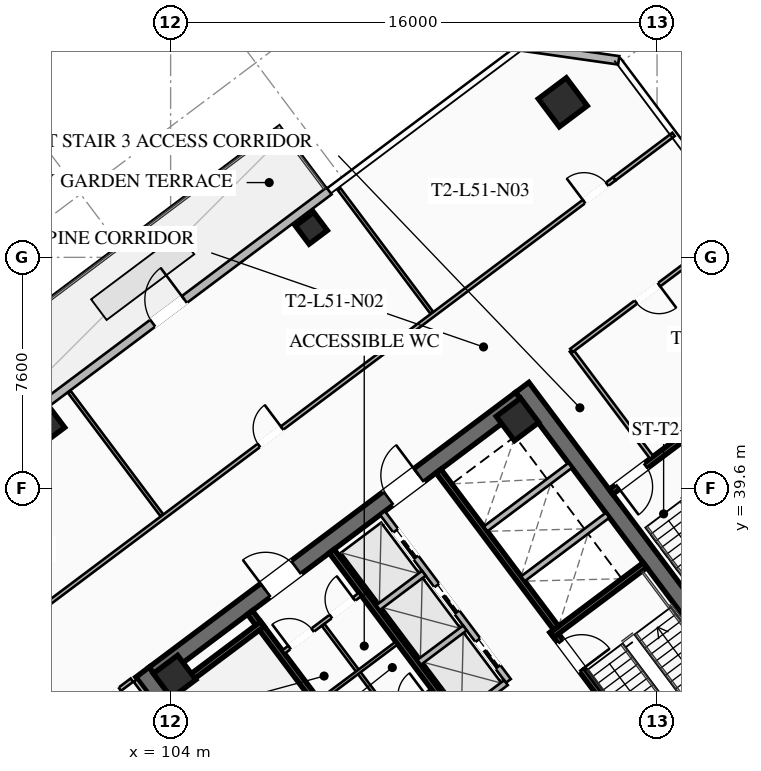
"""IFC4 building model, lengths in metres.
Left out: names, types, materials, properties, quantities, classifications, styles, units other than length and angle.
Written with IfcOpenShell. Run it as: python <this file> out.ifc"""

import sys

from ifc_helpers import new_model, si_unit, direction, frame, frame_2d, origin, origin_2d, place, context, subcontext, project, spatial, rectangle, hollow_rectangle, extrude, element, fill, save


model = new_model("IFC4")
c1 = context("Model", 3, precision=1e-05, world=origin(), true_north=direction((0.0, 1.0)))
c2 = subcontext(c1, "Body", "Model", "MODEL_VIEW")
j1 = project(units=[si_unit("LENGTHUNIT", "METRE"), si_unit("PLANEANGLEUNIT", "RADIAN")], contexts=[c1])
p1 = place(None, origin())
s1 = spatial("IfcSite", under=j1, at=p1, CompositionType="ELEMENT")
p2 = place(p1, origin())
s2 = spatial("IfcBuilding", under=s1, at=p2, CompositionType="ELEMENT")
p3 = place(p2, frame((0.0, 0.0, 188.95)))
s3 = spatial("IfcBuildingStorey", under=s2, at=p3, CompositionType="ELEMENT", Elevation=188.95)
for number, where, z_axis, x_axis in (
    (1, (112.436, 21.077, 0.0), (0.0, 0.0, 1.0), (-0.6, 0.8, 0.0)),
    (2, (115.564, 42.923, 0.0), (0.0, 0.0, 1.0), (0.6, -0.8, 0.0)),
):
    element("IfcWall", number, at=place(p3, frame(where, z_axis=z_axis, x_axis=x_axis)), inside=s3, PredefinedType="SHEAR", context=c2, shape_type="SweptSolid", body=[
        extrude(rectangle(XDim=15.6, YDim=0.55, at=frame_2d((7.8, 0.0))), origin(), (0.0, 0.0, 1.0), 3.55),
    ])
p4 = place(p3, frame((103.461, 33.502, 0.0), z_axis=(0.0, 0.0, 1.0), x_axis=(0.799998054672, 0.600002593761, 0.0)))
e3 = element("IfcWall", 3, at=p4, inside=s3, PredefinedType="SHEAR", context=c2, shape_type="SweptSolid", body=[
    extrude(rectangle(XDim=15.06, YDim=0.55, at=frame_2d((7.53, 0.0))), origin(), (0.0, 0.0, 1.0), 3.55),
])
p5 = place(p4, frame((4.58, 0.0, 0.0)))
e4 = element("IfcOpeningElement", 4, at=p5, cuts=e3, PredefinedType="OPENING", context=c2, shape_type="SweptSolid", body=[
    extrude(rectangle(XDim=1.25, YDim=2.25, at=frame_2d((0.625, 1.125))), frame((0.0, 0.285, 0.0), z_axis=(0.0, -1.0, 0.0), x_axis=(1.0, 0.0, 0.0)), (0.0, 0.0, 1.0), 0.57),
])
p6 = place(p4, frame((9.63, 0.0, 0.0)))
e5 = element("IfcOpeningElement", 5, at=p6, cuts=e3, PredefinedType="OPENING", context=c2, shape_type="SweptSolid", body=[
    extrude(rectangle(XDim=1.25, YDim=2.25, at=frame_2d((0.625, 1.125))), frame((0.0, 0.285, 0.0), z_axis=(0.0, -1.0, 0.0), x_axis=(1.0, 0.0, 0.0)), (0.0, 0.0, 1.0), 0.57),
])
for number, where, z_axis, x_axis in (
    (6, (115.41, 41.87, 0.0), (0.0, 0.0, 1.0), (0.8, 0.6, 0.0)),
    (7, (104.13, 33.41, 0.0), (0.0, 0.0, 1.0), (0.8, 0.6, 0.0)),
):
    element("IfcColumn", number, at=place(p3, frame(where, z_axis=z_axis, x_axis=x_axis)), inside=s3, PredefinedType="COLUMN", context=c2, shape_type="SweptSolid", body=[
        extrude(hollow_rectangle(XDim=1.0, YDim=1.0, WallThickness=0.04, at=origin_2d()), origin(), (0.0, 0.0, 1.0), 3.37),
    ])
p7 = place(p3, frame((116.9, 52.3, 0.0), z_axis=(0.0, 0.0, 1.0), x_axis=(0.799999996291, 0.600000004945, 0.0)))
e8 = element("IfcColumn", 8, at=p7, inside=s3, PredefinedType="COLUMN", context=c2, shape_type="SweptSolid", body=[
    extrude(hollow_rectangle(XDim=1.15, YDim=1.15, WallThickness=0.045, at=origin_2d()), origin(), (0.0, 0.0, 1.0), 3.37),
])
for number, where, z_axis, x_axis in (
    (9, (108.63, 48.16, 0.0), (0.0, 0.0, 1.0), (0.8, 0.6, 0.0)),
    (10, (99.99, 41.68, 0.0), (0.0, 0.0, 1.0), (0.8, 0.6, 0.0)),
):
    element("IfcColumn", number, at=place(p3, frame(where, z_axis=z_axis, x_axis=x_axis)), inside=s3, PredefinedType="COLUMN", context=c2, shape_type="SweptSolid", body=[
        extrude(hollow_rectangle(XDim=0.75, YDim=0.75, WallThickness=0.032, at=origin_2d()), origin(), (0.0, 0.0, 1.0), 3.37),
    ])
p8 = place(p3, frame((98.652, 41.464, 0.0), z_axis=(0.0, 0.0, 1.0), x_axis=(0.799997780501, 0.60000295932, 0.0)))
e11 = element("IfcWall", 11, at=p8, inside=s3, PredefinedType="SOLIDWALL", context=c2, shape_type="SweptSolid", body=[
    extrude(rectangle(XDim=13.2, YDim=0.28, at=frame_2d((6.6, 0.0))), origin(), (0.0, 0.0, 1.0), 3.37),
])
p9 = place(p8, frame((5.95, 0.0, 0.0)))
e12 = element("IfcOpeningElement", 12, at=p9, cuts=e11, PredefinedType="OPENING", context=c2, shape_type="SweptSolid", body=[
    extrude(rectangle(XDim=1.3, YDim=2.15, at=frame_2d((0.65, 1.075))), frame((0.0, 0.15, 0.0), z_axis=(0.0, -1.0, 0.0), x_axis=(1.0, 0.0, 0.0)), (0.0, 0.0, 1.0), 0.3),
])
p10 = place(p3, frame((115.52, 54.14, 0.0), z_axis=(0.0, 0.0, 1.0), x_axis=(0.989950994782, -0.141410847992, 0.0)))
e13 = element("IfcWall", 13, at=p10, inside=s3, PredefinedType="SOLIDWALL", context=c2, shape_type="SweptSolid", body=[
    extrude(rectangle(XDim=3.253, YDim=0.28, at=frame_2d((1.626, 0.0))), origin(), (0.0, 0.0, 1.0), 3.37),
])
p11 = place(p3, frame((111.44, 29.08, 0.0), z_axis=(0.0, 0.0, 1.0), x_axis=(-0.59999029481, 0.8000072788, 0.0)))
e14 = element("IfcWall", 14, at=p11, inside=s3, PredefinedType="SHEAR", context=c2, shape_type="SweptSolid", body=[
    extrude(rectangle(XDim=8.05, YDim=0.2, at=frame_2d((4.025, 0.0))), origin(), (0.0, 0.0, 1.0), 3.37),
])
p12 = place(p11, frame((0.45, 0.0, 0.0)))
e15 = element("IfcOpeningElement", 15, at=p12, cuts=e14, PredefinedType="OPENING", context=c2, shape_type="SweptSolid", body=[
    extrude(rectangle(XDim=1.15, YDim=2.2, at=frame_2d((0.575, 1.1))), frame((0.0, 0.11, 0.0), z_axis=(0.0, -1.0, 0.0), x_axis=(1.0, 0.0, 0.0)), (0.0, 0.0, 1.0), 0.22),
])
p13 = place(p3, frame((103.956, 32.842, 0.0), z_axis=(0.0, 0.0, 1.0), x_axis=(0.800015298837, 0.599979601008, 0.0)))
e16 = element("IfcWall", 16, at=p13, inside=s3, PredefinedType="SHEAR", context=c2, shape_type="SweptSolid", body=[
    extrude(rectangle(XDim=3.83, YDim=0.2, at=frame_2d((1.915, 0.0))), origin(), (0.0, 0.0, 1.0), 3.37),
])
p14 = place(p3, frame((116.56, 34.92, 0.0), z_axis=(0.0, 0.0, 1.0), x_axis=(0.59999029481, -0.8000072788, 0.0)))
e17 = element("IfcWall", 17, at=p14, inside=s3, PredefinedType="SHEAR", context=c2, shape_type="SweptSolid", body=[
    extrude(rectangle(XDim=8.05, YDim=0.2, at=frame_2d((4.025, 0.0))), origin(), (0.0, 0.0, 1.0), 3.37),
])
p15 = place(p14, frame((0.45, 0.0, 0.0)))
e18 = element("IfcOpeningElement", 18, at=p15, cuts=e17, PredefinedType="OPENING", context=c2, shape_type="SweptSolid", body=[
    extrude(rectangle(XDim=1.15, YDim=2.2, at=frame_2d((0.575, 1.1))), frame((0.0, 0.11, 0.0), z_axis=(0.0, -1.0, 0.0), x_axis=(1.0, 0.0, 0.0)), (0.0, 0.0, 1.0), 0.22),
])
p16 = place(p3, frame((116.54, 34.78, 0.0), z_axis=(0.0, 0.0, 1.0), x_axis=(0.800015298837, 0.599979601008, 0.0)))
e19 = element("IfcWall", 19, at=p16, inside=s3, PredefinedType="SHEAR", context=c2, shape_type="SweptSolid", body=[
    extrude(rectangle(XDim=3.83, YDim=0.2, at=frame_2d((1.915, 0.0))), origin(), (0.0, 0.0, 1.0), 3.37),
])
p17 = place(p3, frame((117.998, 25.936, 0.0), z_axis=(0.0, 0.0, 1.0), x_axis=(-0.600002693989, 0.799997979501, 0.0)))
e20 = element("IfcWall", 20, at=p17, inside=s3, PredefinedType="SHEAR", context=c2, shape_type="SweptSolid", body=[
    extrude(rectangle(XDim=14.5, YDim=0.2, at=frame_2d((7.25, 0.0))), origin(), (0.0, 0.0, 1.0), 3.37),
])
p18 = place(p3, frame((110.104, 31.028, 0.0), z_axis=(0.0, 0.0, 1.0), x_axis=(0.800018601094, 0.59997519774, 0.0)))
e21 = element("IfcWall", 21, at=p18, inside=s3, PredefinedType="SOLIDWALL", context=c2, shape_type="SweptSolid", body=[
    extrude(rectangle(XDim=3.15, YDim=0.22, at=frame_2d((1.575, 0.0))), origin(), (0.0, 0.0, 1.0), 2.723),
])
p19 = place(p18, frame((0.25, 0.0, 0.0)))
e22 = element("IfcOpeningElement", 22, at=p19, cuts=e21, PredefinedType="OPENING", context=c2, shape_type="SweptSolid", body=[
    extrude(rectangle(XDim=0.95, YDim=2.05, at=frame_2d((0.475, 1.025))), frame((0.0, 0.12, 0.0), z_axis=(0.0, -1.0, 0.0), x_axis=(1.0, 0.0, 0.0)), (0.0, 0.0, 1.0), 0.24),
])
p20 = place(p18, frame((1.95, 0.0, 0.0)))
e23 = element("IfcOpeningElement", 23, at=p20, cuts=e21, PredefinedType="OPENING", context=c2, shape_type="SweptSolid", body=[
    extrude(rectangle(XDim=0.95, YDim=2.05, at=frame_2d((0.475, 1.025))), frame((0.0, 0.12, 0.0), z_axis=(0.0, -1.0, 0.0), x_axis=(1.0, 0.0, 0.0)), (0.0, 0.0, 1.0), 0.24),
])
p21 = place(p3, frame((112.81, 40.17, 0.0), z_axis=(0.0, 0.0, 1.0), x_axis=(0.599993943644, -0.800004542231, 0.0)))
e24 = element("IfcWall", 24, at=p21, inside=s3, PredefinedType="SHEAR", context=c2, shape_type="SweptSolid", body=[
    extrude(rectangle(XDim=6.45, YDim=0.2, at=frame_2d((3.225, 0.0))), origin(), (0.0, 0.0, 1.0), 3.37),
])
for number, where, z_axis, x_axis in (
    (25, (115.59, 36.63, 0.0), (0.0, 0.0, 1.0), (0.8, 0.6, 0.0)),
    (26, (114.36, 38.27, 0.0), (0.0, 0.0, 1.0), (0.8, 0.6, 0.0)),
):
    element("IfcWall", number, at=place(p3, frame(where, z_axis=z_axis, x_axis=x_axis)), inside=s3, PredefinedType="SOLIDWALL", context=c2, shape_type="SweptSolid", body=[
        extrude(rectangle(XDim=3.48, YDim=0.2, at=frame_2d((1.74, 0.0))), origin(), (0.0, 0.0, 1.0), 3.37),
    ])
p22 = place(p3, frame((107.71, 34.22, 0.0), z_axis=(0.0, 0.0, 1.0), x_axis=(0.799981399002, 0.60002480053, 0.0)))
e27 = element("IfcWall", 27, at=p22, inside=s3, PredefinedType="PARTITIONING", context=c2, shape_type="SweptSolid", body=[
    extrude(rectangle(XDim=3.15, YDim=0.135, at=frame_2d((1.575, 0.0))), origin(), (0.0, 0.0, 1.0), 2.723),
])
p23 = place(p22, frame((0.25, 0.0, 0.0)))
e28 = element("IfcOpeningElement", 28, at=p23, cuts=e27, PredefinedType="OPENING", context=c2, shape_type="SweptSolid", body=[
    extrude(rectangle(XDim=0.95, YDim=2.05, at=frame_2d((0.475, 1.025))), frame((0.0, 0.077, 0.0), z_axis=(0.0, -1.0, 0.0), x_axis=(1.0, 0.0, 0.0)), (0.0, 0.0, 1.0), 0.155),
])
p24 = place(p22, frame((1.95, 0.0, 0.0)))
e29 = element("IfcOpeningElement", 29, at=p24, cuts=e27, PredefinedType="OPENING", context=c2, shape_type="SweptSolid", body=[
    extrude(rectangle(XDim=0.95, YDim=2.05, at=frame_2d((0.475, 1.025))), frame((0.0, 0.077, 0.0), z_axis=(0.0, -1.0, 0.0), x_axis=(1.0, 0.0, 0.0)), (0.0, 0.0, 1.0), 0.155),
])
p25 = place(p3, frame((111.296, 32.072, 0.0), z_axis=(0.0, 0.0, 1.0), x_axis=(-0.59995887973, 0.800030838552, 0.0)))
e30 = element("IfcWall", 30, at=p25, inside=s3, PredefinedType="PARTITIONING", context=c2, shape_type="SweptSolid", body=[
    extrude(rectangle(XDim=3.8, YDim=0.11, at=frame_2d((1.9, 0.0))), origin(), (0.0, 0.0, 1.0), 2.723),
])
p26 = place(p3, frame((108.91, 32.62, 0.0), z_axis=(0.0, 0.0, 1.0), x_axis=(0.800018601094, 0.59997519774, 0.0)))
e31 = element("IfcWall", 31, at=p26, inside=s3, PredefinedType="PARTITIONING", context=c2, shape_type="SweptSolid", body=[
    extrude(rectangle(XDim=3.15, YDim=0.11, at=frame_2d((1.575, 0.0))), origin(), (0.0, 0.0, 1.0), 2.723),
])
p27 = place(p3, frame((115.11, 33.27, 0.0), z_axis=(0.0, 0.0, 1.0), x_axis=(-0.600011322243, 0.799991508192, 0.0)))
e32 = element("IfcWall", 32, at=p27, inside=s3, PredefinedType="SOLIDWALL", context=c2, shape_type="SweptSolid", body=[
    extrude(rectangle(XDim=6.9, YDim=0.2, at=frame_2d((3.45, 0.0))), origin(), (0.0, 0.0, 1.0), 3.37),
])
p28 = place(p27, frame((0.575, 0.0, 0.0)))
e33 = element("IfcOpeningElement", 33, at=p28, cuts=e32, PredefinedType="OPENING", context=c2, shape_type="SweptSolid", body=[
    extrude(rectangle(XDim=1.1, YDim=2.2, at=frame_2d((0.55, 1.1))), frame((0.0, 0.11, 0.0), z_axis=(0.0, -1.0, 0.0), x_axis=(1.0, 0.0, 0.0)), (0.0, 0.0, 1.0), 0.22),
])
p29 = place(p27, frame((2.825, 0.0, 0.0)))
e34 = element("IfcOpeningElement", 34, at=p29, cuts=e32, PredefinedType="OPENING", context=c2, shape_type="SweptSolid", body=[
    extrude(rectangle(XDim=1.1, YDim=2.2, at=frame_2d((0.55, 1.1))), frame((0.0, 0.11, 0.0), z_axis=(0.0, -1.0, 0.0), x_axis=(1.0, 0.0, 0.0)), (0.0, 0.0, 1.0), 0.22),
])
p30 = place(p27, frame((5.075, 0.0, 0.0)))
e35 = element("IfcOpeningElement", 35, at=p30, cuts=e32, PredefinedType="OPENING", context=c2, shape_type="SweptSolid", body=[
    extrude(rectangle(XDim=1.1, YDim=2.2, at=frame_2d((0.55, 1.1))), frame((0.0, 0.11, 0.0), z_axis=(0.0, -1.0, 0.0), x_axis=(1.0, 0.0, 0.0)), (0.0, 0.0, 1.0), 0.22),
])
p31 = place(p3, frame((113.526, 32.082, 0.0), z_axis=(0.0, 0.0, 1.0), x_axis=(0.800046745961, 0.599937666993, 0.0)))
e36 = element("IfcWall", 36, at=p31, inside=s3, PredefinedType="SOLIDWALL", context=c2, shape_type="SweptSolid", body=[
    extrude(rectangle(XDim=1.88, YDim=0.2, at=frame_2d((0.94, 0.0))), origin(), (0.0, 0.0, 1.0), 3.37),
])
p32 = place(p3, frame((112.176, 33.882, 0.0), z_axis=(0.0, 0.0, 1.0), x_axis=(0.8, 0.6, 0.0)))
e37 = element("IfcWall", 37, at=p32, inside=s3, PredefinedType="SOLIDWALL", context=c2, shape_type="SweptSolid", body=[
    extrude(rectangle(XDim=1.88, YDim=0.2, at=frame_2d((0.94, 0.0))), origin(), (0.0, 0.0, 1.0), 3.37),
])
p33 = place(p3, frame((110.826, 35.682, 0.0), z_axis=(0.0, 0.0, 1.0), x_axis=(0.799984418148, 0.600020775241, 0.0)))
e38 = element("IfcWall", 38, at=p33, inside=s3, PredefinedType="SOLIDWALL", context=c2, shape_type="SweptSolid", body=[
    extrude(rectangle(XDim=1.88, YDim=0.2, at=frame_2d((0.94, 0.0))), origin(), (0.0, 0.0, 1.0), 3.37),
])
p34 = place(p3, frame((121.204, 41.528, 0.0), z_axis=(0.0, 0.0, 1.0), x_axis=(-0.800017232136, -0.599977023131, 0.0)))
e39 = element("IfcWall", 39, at=p34, inside=s3, PredefinedType="SHEAR", context=c2, shape_type="SweptSolid", body=[
    extrude(rectangle(XDim=3.4, YDim=0.2, at=frame_2d((1.7, 0.0))), origin(), (0.0, 0.0, 1.0), 3.37),
])
p35 = place(p34, frame((1.975, 0.0, 0.0)))
e40 = element("IfcOpeningElement", 40, at=p35, cuts=e39, PredefinedType="OPENING", context=c2, shape_type="SweptSolid", body=[
    extrude(rectangle(XDim=1.15, YDim=2.2, at=frame_2d((0.575, 1.1))), frame((0.0, 0.11, 0.0), z_axis=(0.0, -1.0, 0.0), x_axis=(1.0, 0.0, 0.0)), (0.0, 0.0, 1.0), 0.22),
])
p36 = place(p3, frame((119.824, 40.618, 0.0), z_axis=(0.0, 0.0, 1.0), x_axis=(-0.599982243973, 0.800013316712, 0.0)))
e41 = element("IfcWall", 41, at=p36, inside=s3, PredefinedType="PARTITIONING", context=c2, shape_type="SweptSolid", body=[
    extrude(rectangle(XDim=4.4, YDim=0.135, at=frame_2d((2.2, 0.0))), origin(), (0.0, 0.0, 1.0), 2.723),
])
p37 = place(p3, frame((95.638, 32.566, 0.0), z_axis=(0.0, 0.0, 1.0), x_axis=(0.8, 0.6, 0.0)))
e42 = element("IfcWall", 42, at=p37, inside=s3, PredefinedType="PARTITIONING", context=c2, shape_type="SweptSolid", body=[
    extrude(rectangle(XDim=28.7, YDim=0.135, at=frame_2d((14.35, 0.0))), origin(), (0.0, 0.0, 1.0), 2.723),
])
p38 = place(p37, frame((0.3, 0.0, 0.0)))
e43 = element("IfcOpeningElement", 43, at=p38, cuts=e42, PredefinedType="OPENING", context=c2, shape_type="SweptSolid", body=[
    extrude(rectangle(XDim=0.95, YDim=2.05, at=frame_2d((0.475, 1.025))), frame((0.0, 0.077, 0.0), z_axis=(0.0, -1.0, 0.0), x_axis=(1.0, 0.0, 0.0)), (0.0, 0.0, 1.0), 0.155),
])
p39 = place(p37, frame((14.083, 0.0, 0.0)))
e44 = element("IfcOpeningElement", 44, at=p39, cuts=e42, PredefinedType="OPENING", context=c2, shape_type="SweptSolid", body=[
    extrude(rectangle(XDim=0.95, YDim=2.05, at=frame_2d((0.475, 1.025))), frame((0.0, 0.077, 0.0), z_axis=(0.0, -1.0, 0.0), x_axis=(1.0, 0.0, 0.0)), (0.0, 0.0, 1.0), 0.155),
])
p40 = place(p37, frame((27.45, 0.0, 0.0)))
e45 = element("IfcOpeningElement", 45, at=p40, cuts=e42, PredefinedType="OPENING", context=c2, shape_type="SweptSolid", body=[
    extrude(rectangle(XDim=0.95, YDim=2.05, at=frame_2d((0.475, 1.025))), frame((0.0, 0.077, 0.0), z_axis=(0.0, -1.0, 0.0), x_axis=(1.0, 0.0, 0.0)), (0.0, 0.0, 1.0), 0.155),
])
p41 = place(p3, frame((118.598, 49.786, 0.0), z_axis=(0.0, 0.0, 1.0), x_axis=(0.800012055778, 0.599983925293, 0.0)))
e46 = element("IfcWall", 46, at=p41, inside=s3, PredefinedType="PARTITIONING", context=c2, shape_type="SweptSolid", body=[
    extrude(rectangle(XDim=2.43, YDim=0.135, at=frame_2d((1.215, 0.0))), origin(), (0.0, 0.0, 1.0), 2.723),
])
p42 = place(p3, frame((103.71, 38.72, 0.0), z_axis=(0.0, 0.0, 1.0), x_axis=(-0.599984620597, 0.800011534321, 0.0)))
e47 = element("IfcWall", 47, at=p42, inside=s3, PredefinedType="PARTITIONING", context=c2, shape_type="SweptSolid", body=[
    extrude(rectangle(XDim=5.08, YDim=0.11, at=frame_2d((2.54, 0.0))), origin(), (0.0, 0.0, 1.0), 2.723),
])
p43 = place(p3, frame((112.59, 45.38, 0.0), z_axis=(0.0, 0.0, 1.0), x_axis=(-0.599992310844, 0.800005766809, 0.0)))
e48 = element("IfcWall", 48, at=p43, inside=s3, PredefinedType="PARTITIONING", context=c2, shape_type="SweptSolid", body=[
    extrude(rectangle(XDim=5.08, YDim=0.11, at=frame_2d((2.54, 0.0))), origin(), (0.0, 0.0, 1.0), 2.723),
])
p44 = place(p3, frame((122.744, 48.308, 0.0), z_axis=(0.0, 0.0, 1.0), x_axis=(-0.79997892247, -0.600028102345, 0.0)))
e49 = element("IfcWall", 49, at=p44, inside=s3, PredefinedType="PARTITIONING", context=c2, shape_type="SweptSolid", body=[
    extrude(rectangle(XDim=6.95, YDim=0.135, at=frame_2d((3.475, 0.0))), origin(), (0.0, 0.0, 1.0), 2.723),
])
p45 = place(p44, frame((3.35, 0.0, 0.0)))
e50 = element("IfcOpeningElement", 50, at=p45, cuts=e49, PredefinedType="OPENING", context=c2, shape_type="SweptSolid", body=[
    extrude(rectangle(XDim=0.95, YDim=2.05, at=frame_2d((0.475, 1.025))), frame((0.0, 0.077, 0.0), z_axis=(0.0, -1.0, 0.0), x_axis=(1.0, 0.0, 0.0)), (0.0, 0.0, 1.0), 0.155),
])
p46 = place(p3, frame((112.104, 20.928, 0.0), z_axis=(0.0, 0.0, 1.0), x_axis=(-0.599994940075, 0.800003794918, 0.0)))
e51 = element("IfcWall", 51, at=p46, inside=s3, PredefinedType="PARTITIONING", context=c2, shape_type="SweptSolid", body=[
    extrude(rectangle(XDim=15.44, YDim=0.135, at=frame_2d((7.72, 0.0))), origin(), (0.0, 0.0, 1.0), 2.723),
])
p47 = place(p3, frame((102.728, 33.296, 0.0), z_axis=(0.0, 0.0, 1.0), x_axis=(-0.800013722153, -0.59998170336, 0.0)))
e52 = element("IfcWall", 52, at=p47, inside=s3, PredefinedType="PARTITIONING", context=c2, shape_type="SweptSolid", body=[
    extrude(rectangle(XDim=8.54, YDim=0.135, at=frame_2d((4.27, 0.0))), origin(), (0.0, 0.0, 1.0), 2.723),
])
p48 = place(p47, frame((0.5, 0.0, 0.0)))
e53 = element("IfcOpeningElement", 53, at=p48, cuts=e52, PredefinedType="OPENING", context=c2, shape_type="SweptSolid", body=[
    extrude(rectangle(XDim=0.95, YDim=2.05, at=frame_2d((0.475, 1.025))), frame((0.0, 0.077, 0.0), z_axis=(0.0, -1.0, 0.0), x_axis=(1.0, 0.0, 0.0)), (0.0, 0.0, 1.0), 0.155),
])
p49 = place(p9, origin())
e54 = element("IfcDoor", 54, at=p49, inside=s3, OperationType="SINGLE_SWING_RIGHT", PredefinedType="DOOR", context=c2, shape_type="SweptSolid", body=[
    extrude(rectangle(XDim=1.3, YDim=2.15, at=frame_2d((0.65, 1.075))), frame((0.0, 0.025, 0.0), z_axis=(0.0, -1.0, 0.0), x_axis=(1.0, 0.0, 0.0)), (0.0, 0.0, 1.0), 0.05),
])
fill(e12, e54)
p50 = place(p5, origin())
e55 = element("IfcDoor", 55, at=p50, inside=s3, OperationType="SINGLE_SWING_LEFT", PredefinedType="DOOR", context=c2, shape_type="SweptSolid", body=[
    extrude(rectangle(XDim=1.25, YDim=2.25, at=frame_2d((0.625, 1.125))), frame((0.0, 0.025, 0.0), z_axis=(0.0, -1.0, 0.0), x_axis=(1.0, 0.0, 0.0)), (0.0, 0.0, 1.0), 0.05),
])
fill(e4, e55)
p51 = place(p6, origin())
e56 = element("IfcDoor", 56, at=p51, inside=s3, OperationType="SINGLE_SWING_RIGHT", PredefinedType="DOOR", context=c2, shape_type="SweptSolid", body=[
    extrude(rectangle(XDim=1.25, YDim=2.25, at=frame_2d((0.625, 1.125))), frame((0.0, 0.025, 0.0), z_axis=(0.0, -1.0, 0.0), x_axis=(1.0, 0.0, 0.0)), (0.0, 0.0, 1.0), 0.05),
])
fill(e5, e56)
p52 = place(p15, origin())
e57 = element("IfcDoor", 57, at=p52, inside=s3, OperationType="SINGLE_SWING_RIGHT", PredefinedType="DOOR", context=c2, shape_type="SweptSolid", body=[
    extrude(rectangle(XDim=1.15, YDim=2.2, at=frame_2d((0.575, 1.1))), frame((0.0, 0.025, 0.0), z_axis=(0.0, -1.0, 0.0), x_axis=(1.0, 0.0, 0.0)), (0.0, 0.0, 1.0), 0.05),
])
fill(e18, e57)
p53 = place(p23, origin())
e58 = element("IfcDoor", 58, at=p53, inside=s3, OperationType="SINGLE_SWING_LEFT", PredefinedType="DOOR", context=c2, shape_type="SweptSolid", body=[
    extrude(rectangle(XDim=0.95, YDim=2.05, at=frame_2d((0.475, 1.025))), frame((0.0, 0.025, 0.0), z_axis=(0.0, -1.0, 0.0), x_axis=(1.0, 0.0, 0.0)), (0.0, 0.0, 1.0), 0.05),
])
fill(e28, e58)
p54 = place(p24, origin())
e59 = element("IfcDoor", 59, at=p54, inside=s3, OperationType="SINGLE_SWING_RIGHT", PredefinedType="DOOR", context=c2, shape_type="SweptSolid", body=[
    extrude(rectangle(XDim=0.95, YDim=2.05, at=frame_2d((0.475, 1.025))), frame((0.0, 0.025, 0.0), z_axis=(0.0, -1.0, 0.0), x_axis=(1.0, 0.0, 0.0)), (0.0, 0.0, 1.0), 0.05),
])
fill(e29, e59)
p55 = place(p35, origin())
e60 = element("IfcDoor", 60, at=p55, inside=s3, OperationType="SINGLE_SWING_RIGHT", PredefinedType="DOOR", context=c2, shape_type="SweptSolid", body=[
    extrude(rectangle(XDim=1.15, YDim=2.2, at=frame_2d((0.575, 1.1))), frame((0.0, 0.025, 0.0), z_axis=(0.0, -1.0, 0.0), x_axis=(1.0, 0.0, 0.0)), (0.0, 0.0, 1.0), 0.05),
])
fill(e40, e60)
p56 = place(p39, origin())
e61 = element("IfcDoor", 61, at=p56, inside=s3, OperationType="SINGLE_SWING_RIGHT", PredefinedType="DOOR", context=c2, shape_type="SweptSolid", body=[
    extrude(rectangle(XDim=0.95, YDim=2.05, at=frame_2d((0.475, 1.025))), frame((0.0, 0.025, 0.0), z_axis=(0.0, -1.0, 0.0), x_axis=(1.0, 0.0, 0.0)), (0.0, 0.0, 1.0), 0.05),
])
fill(e44, e61)
p57 = place(p40, origin())
e62 = element("IfcDoor", 62, at=p57, inside=s3, OperationType="SINGLE_SWING_LEFT", PredefinedType="DOOR", context=c2, shape_type="SweptSolid", body=[
    extrude(rectangle(XDim=0.95, YDim=2.05, at=frame_2d((0.475, 1.025))), frame((0.0, 0.025, 0.0), z_axis=(0.0, -1.0, 0.0), x_axis=(1.0, 0.0, 0.0)), (0.0, 0.0, 1.0), 0.05),
])
fill(e45, e62)
p58 = place(p45, origin())
e63 = element("IfcDoor", 63, at=p58, inside=s3, OperationType="SINGLE_SWING_LEFT", PredefinedType="DOOR", context=c2, shape_type="SweptSolid", body=[
    extrude(rectangle(XDim=0.95, YDim=2.05, at=frame_2d((0.475, 1.025))), frame((0.0, 0.025, 0.0), z_axis=(0.0, -1.0, 0.0), x_axis=(1.0, 0.0, 0.0)), (0.0, 0.0, 1.0), 0.05),
])
fill(e50, e63)
p59 = place(p48, origin())
e64 = element("IfcDoor", 64, at=p59, inside=s3, OperationType="SINGLE_SWING_LEFT", PredefinedType="DOOR", context=c2, shape_type="SweptSolid", body=[
    extrude(rectangle(XDim=0.95, YDim=2.05, at=frame_2d((0.475, 1.025))), frame((0.0, 0.025, 0.0), z_axis=(0.0, -1.0, 0.0), x_axis=(1.0, 0.0, 0.0)), (0.0, 0.0, 1.0), 0.05),
])
fill(e53, e64)
p60 = place(p28, origin())
e65 = element("IfcDoor", 65, at=p60, inside=s3, OperationType="SLIDING_TO_LEFT", PredefinedType="DOOR", context=c2, shape_type="SweptSolid", body=[
    extrude(rectangle(XDim=1.1, YDim=2.2, at=frame_2d((0.55, 1.1))), frame((0.0, 0.025, 0.0), z_axis=(0.0, -1.0, 0.0), x_axis=(1.0, 0.0, 0.0)), (0.0, 0.0, 1.0), 0.05),
])
fill(e33, e65)
p61 = place(p29, origin())
e66 = element("IfcDoor", 66, at=p61, inside=s3, OperationType="SLIDING_TO_LEFT", PredefinedType="DOOR", context=c2, shape_type="SweptSolid", body=[
    extrude(rectangle(XDim=1.1, YDim=2.2, at=frame_2d((0.55, 1.1))), frame((0.0, 0.025, 0.0), z_axis=(0.0, -1.0, 0.0), x_axis=(1.0, 0.0, 0.0)), (0.0, 0.0, 1.0), 0.05),
])
fill(e34, e66)
p62 = place(p30, origin())
e67 = element("IfcDoor", 67, at=p62, inside=s3, OperationType="SLIDING_TO_LEFT", PredefinedType="DOOR", context=c2, shape_type="SweptSolid", body=[
    extrude(rectangle(XDim=1.1, YDim=2.2, at=frame_2d((0.55, 1.1))), frame((0.0, 0.025, 0.0), z_axis=(0.0, -1.0, 0.0), x_axis=(1.0, 0.0, 0.0)), (0.0, 0.0, 1.0), 0.05),
])
fill(e35, e67)
save(model, sys.argv[1])
